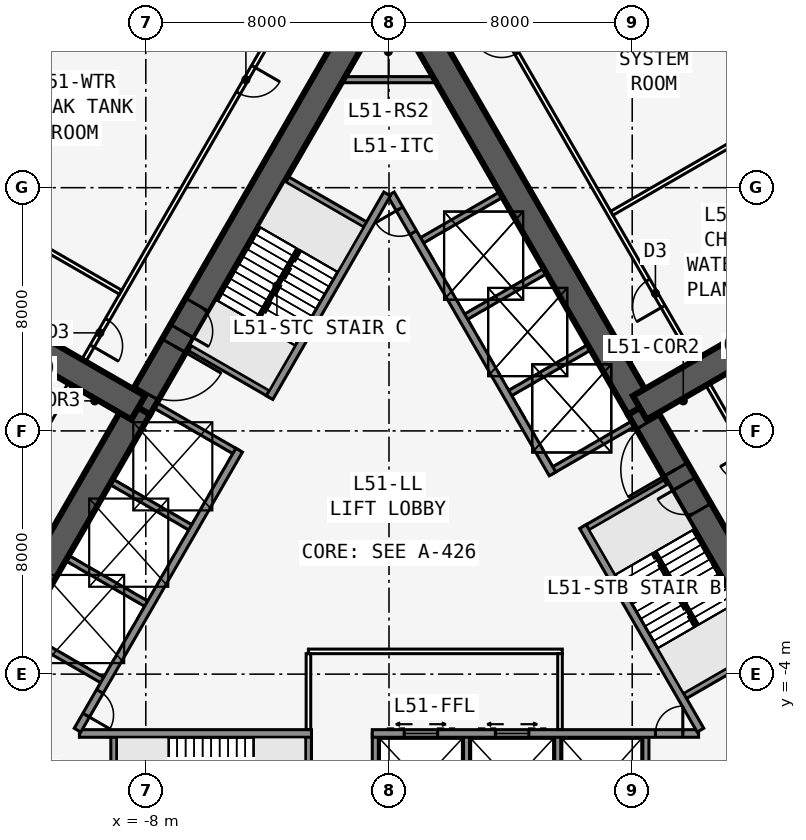
"""IFC4 building model, lengths in metres.
Left out: names, types, materials, properties, quantities, classifications, styles, units other than length and angle.
Written with IfcOpenShell. Run it as: python <this file> out.ifc"""

import sys

from ifc_helpers import new_model, si_unit, direction, frame, frame_2d, origin, place, context, subcontext, project, spatial, rectangle, extrude, element, fill, save


model = new_model("IFC4")
c1 = context("Model", 3, precision=1e-05, world=origin(), true_north=direction((0.0, 1.0)))
c2 = subcontext(c1, "Body", "Model", "MODEL_VIEW")
j1 = project(units=[si_unit("LENGTHUNIT", "METRE"), si_unit("PLANEANGLEUNIT", "RADIAN")], contexts=[c1])
p1 = place(None, origin())
s1 = spatial("IfcSite", under=j1, at=p1, CompositionType="ELEMENT")
p2 = place(p1, origin())
s2 = spatial("IfcBuilding", under=s1, at=p2, CompositionType="ELEMENT")
p3 = place(p2, frame((0.0, 0.0, 189.5)))
s3 = spatial("IfcBuildingStorey", under=s2, at=p3, CompositionType="ELEMENT", Elevation=189.5)
p4 = place(p3, frame((-10.183, -5.951, 0.0), z_axis=(0.0, 0.0, 1.0), x_axis=(1.0, 0.0, 0.0)))
e1 = element("IfcWall", 1, at=p4, inside=s3, PredefinedType="SOLIDWALL", context=c2, shape_type="SweptSolid", body=[
    extrude(rectangle(XDim=7.633, YDim=0.25, at=frame_2d((3.816, 0.0))), origin(), (0.0, 0.0, 1.0), 6.15),
])
p5 = place(p3, frame((-0.55, -5.951, 0.0), z_axis=(0.0, 0.0, 1.0), x_axis=(1.0, 0.0, 0.0)))
e2 = element("IfcWall", 2, at=p5, inside=s3, PredefinedType="SOLIDWALL", context=c2, shape_type="SweptSolid", body=[
    extrude(rectangle(XDim=10.733, YDim=0.25, at=frame_2d((5.366, 0.0))), origin(), (0.0, 0.0, 1.0), 6.15),
])
p6 = place(p5, frame((9.314, 0.0, 0.0)))
e3 = element("IfcOpeningElement", 3, at=p6, cuts=e2, PredefinedType="OPENING", context=c2, shape_type="SweptSolid", body=[
    extrude(rectangle(XDim=0.9, YDim=2.13, at=frame_2d((0.45, 1.065))), frame((0.0, 0.135, 0.0), z_axis=(0.0, -1.0, 0.0), x_axis=(1.0, 0.0, 0.0)), (0.0, 0.0, 1.0), 0.27),
])
p7 = place(p5, frame((1.05, 0.0, 0.0)))
e4 = element("IfcOpeningElement", 4, at=p7, cuts=e2, PredefinedType="OPENING", context=c2, shape_type="SweptSolid", body=[
    extrude(rectangle(XDim=1.1, YDim=2.13, at=frame_2d((0.55, 1.065))), frame((0.0, 0.135, 0.0), z_axis=(0.0, -1.0, 0.0), x_axis=(1.0, 0.0, 0.0)), (0.0, 0.0, 1.0), 0.27),
])
p8 = place(p5, frame((4.05, 0.0, 0.0)))
e5 = element("IfcOpeningElement", 5, at=p8, cuts=e2, PredefinedType="OPENING", context=c2, shape_type="SweptSolid", body=[
    extrude(rectangle(XDim=1.1, YDim=2.13, at=frame_2d((0.55, 1.065))), frame((0.0, 0.135, 0.0), z_axis=(0.0, -1.0, 0.0), x_axis=(1.0, 0.0, 0.0)), (0.0, 0.0, 1.0), 0.27),
])
p9 = place(p3, frame((-9.05, -5.951, 0.0), z_axis=(0.0, 0.0, 1.0), x_axis=(0.0, -1.0, 0.0)))
e6 = element("IfcWall", 6, at=p9, inside=s3, PredefinedType="SOLIDWALL", context=c2, shape_type="SweptSolid", body=[
    extrude(rectangle(XDim=3.125, YDim=0.2, at=frame_2d((1.562, 0.0))), origin(), (0.0, 0.0, 1.0), 6.15),
])
p10 = place(p3, frame((-2.65, -5.951, 0.0), z_axis=(0.0, 0.0, 1.0), x_axis=(0.0, -1.0, 0.0)))
e7 = element("IfcWall", 7, at=p10, inside=s3, PredefinedType="SOLIDWALL", context=c2, shape_type="SweptSolid", body=[
    extrude(rectangle(XDim=3.125, YDim=0.2, at=frame_2d((1.562, 0.0))), origin(), (0.0, 0.0, 1.0), 6.15),
])
p11 = place(p10, frame((1.525, 0.0, 0.0)))
e8 = element("IfcOpeningElement", 8, at=p11, cuts=e7, PredefinedType="OPENING", context=c2, shape_type="SweptSolid", body=[
    extrude(rectangle(XDim=1.0, YDim=2.13, at=frame_2d((0.5, 1.065))), frame((0.0, 0.11, 0.0), z_axis=(0.0, -1.0, 0.0), x_axis=(1.0, 0.0, 0.0)), (0.0, 0.0, 1.0), 0.22),
])
for number, where, z_axis, x_axis in (
    (9, (-0.45, -5.951, 0.0), (0.0, 0.0, 1.0), (0.0, -1.0, 0.0)),
    (10, (2.55, -5.951, 0.0), (0.0, 0.0, 1.0), (0.0, -1.0, 0.0)),
    (11, (5.55, -5.951, 0.0), (0.0, 0.0, 1.0), (0.0, -1.0, 0.0)),
    (12, (8.45, -5.951, 0.0), (0.0, 0.0, 1.0), (0.0, -1.0, 0.0)),
):
    element("IfcWall", number, at=place(p3, frame(where, z_axis=z_axis, x_axis=x_axis)), inside=s3, PredefinedType="SOLIDWALL", context=c2, shape_type="SweptSolid", body=[
        extrude(rectangle(XDim=3.125, YDim=0.2, at=frame_2d((1.562, 0.0))), origin(), (0.0, 0.0, 1.0), 6.15),
    ])
p12 = place(p3, frame((16.5, -9.526, 0.0), z_axis=(0.0, 0.0, 1.0), x_axis=(-0.499996545922, 0.866027397988, 0.0)))
e13 = element("IfcWall", 13, at=p12, inside=s3, PredefinedType="SHEAR", context=c2, shape_type="SweptSolid", body=[
    extrude(rectangle(XDim=16.5, YDim=0.9, at=frame_2d((8.25, 0.0))), origin(), (0.0, 0.0, 1.0), 6.4),
])
p13 = place(p12, frame((14.15, 0.0, 0.0)))
e14 = element("IfcOpeningElement", 14, at=p13, cuts=e13, PredefinedType="OPENING", context=c2, shape_type="SweptSolid", body=[
    extrude(rectangle(XDim=1.8, YDim=2.13, at=frame_2d((0.9, 1.065))), frame((0.0, 0.46, 0.0), z_axis=(0.0, -1.0, 0.0), x_axis=(1.0, 0.0, 0.0)), (0.0, 0.0, 1.0), 0.92),
])
p14 = place(p12, frame((12.6, 0.0, 0.0)))
e15 = element("IfcOpeningElement", 15, at=p14, cuts=e13, PredefinedType="OPENING", context=c2, shape_type="SweptSolid", body=[
    extrude(rectangle(XDim=1.0, YDim=2.13, at=frame_2d((0.5, 1.065))), frame((0.0, 0.46, 0.0), z_axis=(0.0, -1.0, 0.0), x_axis=(1.0, 0.0, 0.0)), (0.0, 0.0, 1.0), 0.92),
])
p15 = place(p3, frame((8.25, 4.763, 0.0), z_axis=(0.0, 0.0, 1.0), x_axis=(-0.500002952946, 0.866023698893, 0.0)))
e16 = element("IfcWall", 16, at=p15, inside=s3, PredefinedType="SHEAR", context=c2, shape_type="SweptSolid", body=[
    extrude(rectangle(XDim=16.5, YDim=0.9, at=frame_2d((8.25, 0.0))), origin(), (0.0, 0.0, 1.0), 6.4),
])
p16 = place(p3, frame((10.245, -5.843, 0.0), z_axis=(0.0, 0.0, 1.0), x_axis=(-0.499993009313, 0.866029439822, 0.0)))
e17 = element("IfcWall", 17, at=p16, inside=s3, PredefinedType="SOLIDWALL", context=c2, shape_type="SweptSolid", body=[
    extrude(rectangle(XDim=7.733, YDim=0.25, at=frame_2d((3.866, 0.0))), origin(), (0.0, 0.0, 1.0), 6.15),
])
p17 = place(p3, frame((5.379, 2.586, 0.0), z_axis=(0.0, 0.0, 1.0), x_axis=(-0.500001375892, 0.866024609411, 0.0)))
e18 = element("IfcWall", 18, at=p17, inside=s3, PredefinedType="SOLIDWALL", context=c2, shape_type="SweptSolid", body=[
    extrude(rectangle(XDim=10.633, YDim=0.25, at=frame_2d((5.316, 0.0))), origin(), (0.0, 0.0, 1.0), 6.15),
])
p18 = place(p17, frame((9.164, 0.0, 0.0)))
e19 = element("IfcOpeningElement", 19, at=p18, cuts=e18, PredefinedType="OPENING", context=c2, shape_type="SweptSolid", body=[
    extrude(rectangle(XDim=0.9, YDim=2.13, at=frame_2d((0.45, 1.065))), frame((0.0, 0.135, 0.0), z_axis=(0.0, -1.0, 0.0), x_axis=(1.0, 0.0, 0.0)), (0.0, 0.0, 1.0), 0.27),
])
for number, where, z_axis, x_axis in (
    (20, (9.629, -4.775, 0.0), (0.0, 0.0, 1.0), (0.866, 0.5, 0.0)),
    (21, (6.429, 0.767, 0.0), (0.0, 0.0, 1.0), (0.866, 0.5, 0.0)),
    (22, (5.329, 2.673, 0.0), (0.0, 0.0, 1.0), (0.866, 0.5, 0.0)),
    (23, (3.879, 5.184, 0.0), (0.0, 0.0, 1.0), (0.866, 0.5, 0.0)),
    (24, (2.429, 7.696, 0.0), (0.0, 0.0, 1.0), (0.866, 0.5, 0.0)),
    (25, (0.979, 10.207, 0.0), (0.0, 0.0, 1.0), (0.866, 0.5, 0.0)),
):
    element("IfcWall", number, at=place(p3, frame(where, z_axis=z_axis, x_axis=x_axis)), inside=s3, PredefinedType="SOLIDWALL", context=c2, shape_type="SweptSolid", body=[
        extrude(rectangle(XDim=3.125, YDim=0.2, at=frame_2d((1.562, 0.0))), origin(), (0.0, 0.0, 1.0), 6.15),
    ])
p19 = place(p3, frame((0.0, 19.052, 0.0), z_axis=(0.0, 0.0, 1.0), x_axis=(-0.500002952946, -0.866023698893, 0.0)))
e26 = element("IfcWall", 26, at=p19, inside=s3, PredefinedType="SHEAR", context=c2, shape_type="SweptSolid", body=[
    extrude(rectangle(XDim=16.5, YDim=0.9, at=frame_2d((8.25, 0.0))), origin(), (0.0, 0.0, 1.0), 6.4),
])
p20 = place(p19, frame((14.15, 0.0, 0.0)))
e27 = element("IfcOpeningElement", 27, at=p20, cuts=e26, PredefinedType="OPENING", context=c2, shape_type="SweptSolid", body=[
    extrude(rectangle(XDim=1.8, YDim=2.13, at=frame_2d((0.9, 1.065))), frame((0.0, 0.46, 0.0), z_axis=(0.0, -1.0, 0.0), x_axis=(1.0, 0.0, 0.0)), (0.0, 0.0, 1.0), 0.92),
])
p21 = place(p19, frame((12.6, 0.0, 0.0)))
e28 = element("IfcOpeningElement", 28, at=p21, cuts=e26, PredefinedType="OPENING", context=c2, shape_type="SweptSolid", body=[
    extrude(rectangle(XDim=1.0, YDim=2.13, at=frame_2d((0.5, 1.065))), frame((0.0, 0.46, 0.0), z_axis=(0.0, -1.0, 0.0), x_axis=(1.0, 0.0, 0.0)), (0.0, 0.0, 1.0), 0.92),
])
p22 = place(p3, frame((-8.25, 4.763, 0.0), z_axis=(0.0, 0.0, 1.0), x_axis=(-0.499996545922, -0.866027397988, 0.0)))
e29 = element("IfcWall", 29, at=p22, inside=s3, PredefinedType="SHEAR", context=c2, shape_type="SweptSolid", body=[
    extrude(rectangle(XDim=16.5, YDim=0.9, at=frame_2d((8.25, 0.0))), origin(), (0.0, 0.0, 1.0), 6.4),
])
p23 = place(p3, frame((-0.062, 11.794, 0.0), z_axis=(0.0, 0.0, 1.0), x_axis=(-0.500006680225, -0.86602154692, 0.0)))
e30 = element("IfcWall", 30, at=p23, inside=s3, PredefinedType="SOLIDWALL", context=c2, shape_type="SweptSolid", body=[
    extrude(rectangle(XDim=7.733, YDim=0.25, at=frame_2d((3.866, 0.0))), origin(), (0.0, 0.0, 1.0), 6.15),
])
p24 = place(p3, frame((-4.929, 3.365, 0.0), z_axis=(0.0, 0.0, 1.0), x_axis=(-0.499991433582, -0.866030349552, 0.0)))
e31 = element("IfcWall", 31, at=p24, inside=s3, PredefinedType="SOLIDWALL", context=c2, shape_type="SweptSolid", body=[
    extrude(rectangle(XDim=10.633, YDim=0.25, at=frame_2d((5.316, 0.0))), origin(), (0.0, 0.0, 1.0), 6.15),
])
p25 = place(p24, frame((9.164, 0.0, 0.0)))
e32 = element("IfcOpeningElement", 32, at=p25, cuts=e31, PredefinedType="OPENING", context=c2, shape_type="SweptSolid", body=[
    extrude(rectangle(XDim=0.9, YDim=2.13, at=frame_2d((0.45, 1.065))), frame((0.0, 0.135, 0.0), z_axis=(0.0, -1.0, 0.0), x_axis=(1.0, 0.0, 0.0)), (0.0, 0.0, 1.0), 0.27),
])
for number, where, z_axis, x_axis in (
    (33, (-0.679, 10.727, 0.0), (0.0, 0.0, 1.0), (-0.866, 0.5, 0.0)),
    (34, (-3.879, 5.184, 0.0), (0.0, 0.0, 1.0), (-0.866, 0.5, 0.0)),
    (35, (-4.979, 3.279, 0.0), (0.0, 0.0, 1.0), (-0.866, 0.5, 0.0)),
    (36, (-6.429, 0.767, 0.0), (0.0, 0.0, 1.0), (-0.866, 0.5, 0.0)),
    (37, (-7.879, -1.744, 0.0), (0.0, 0.0, 1.0), (-0.866, 0.5, 0.0)),
    (38, (-9.329, -4.256, 0.0), (0.0, 0.0, 1.0), (-0.866, 0.5, 0.0)),
):
    element("IfcWall", number, at=place(p3, frame(where, z_axis=z_axis, x_axis=x_axis)), inside=s3, PredefinedType="SOLIDWALL", context=c2, shape_type="SweptSolid", body=[
        extrude(rectangle(XDim=3.125, YDim=0.2, at=frame_2d((1.562, 0.0))), origin(), (0.0, 0.0, 1.0), 6.15),
    ])
for number, where, z_axis, x_axis in (
    (39, (8.25, 4.763, 0.0), (0.0, 0.0, 1.0), (0.866, 0.5, 0.0)),
    (40, (-8.25, 4.763, 0.0), (0.0, 0.0, 1.0), (-0.866, 0.5, 0.0)),
):
    element("IfcWall", number, at=place(p3, frame(where, z_axis=z_axis, x_axis=x_axis)), inside=s3, PredefinedType="SHEAR", context=c2, shape_type="SweptSolid", body=[
        extrude(rectangle(XDim=8.154, YDim=0.9, at=frame_2d((4.077, 0.0))), origin(), (0.0, 0.0, 1.0), 6.4),
    ])
p26 = place(p3, frame((20.027, -10.985, 0.0), z_axis=(0.0, 0.0, 1.0), x_axis=(-0.500001677587, 0.866024435227, 0.0)))
e41 = element("IfcWall", 41, at=p26, inside=s3, PredefinedType="PARTITIONING", context=c2, shape_type="SweptSolid", body=[
    extrude(rectangle(XDim=39.054, YDim=0.15, at=frame_2d((19.527, 0.0))), origin(), (0.0, 0.0, 1.0), 6.15),
])
p27 = place(p26, frame((5.914, 0.0, 0.0)))
e42 = element("IfcOpeningElement", 42, at=p27, cuts=e41, PredefinedType="OPENING", context=c2, shape_type="SweptSolid", body=[
    extrude(rectangle(XDim=1.0, YDim=2.13, at=frame_2d((0.5, 1.065))), frame((0.0, 0.085, 0.0), z_axis=(0.0, -1.0, 0.0), x_axis=(1.0, 0.0, 0.0)), (0.0, 0.0, 1.0), 0.17),
])
p28 = place(p26, frame((15.527, 0.0, 0.0)))
e43 = element("IfcOpeningElement", 43, at=p28, cuts=e41, PredefinedType="OPENING", context=c2, shape_type="SweptSolid", body=[
    extrude(rectangle(XDim=1.0, YDim=2.13, at=frame_2d((0.5, 1.065))), frame((0.0, 0.085, 0.0), z_axis=(0.0, -1.0, 0.0), x_axis=(1.0, 0.0, 0.0)), (0.0, 0.0, 1.0), 0.17),
])
p29 = place(p26, frame((22.027, 0.0, 0.0)))
e44 = element("IfcOpeningElement", 44, at=p29, cuts=e41, PredefinedType="OPENING", context=c2, shape_type="SweptSolid", body=[
    extrude(rectangle(XDim=1.0, YDim=2.13, at=frame_2d((0.5, 1.065))), frame((0.0, 0.085, 0.0), z_axis=(0.0, -1.0, 0.0), x_axis=(1.0, 0.0, 0.0)), (0.0, 0.0, 1.0), 0.17),
])
p30 = place(p26, frame((31.64, 0.0, 0.0)))
e45 = element("IfcOpeningElement", 45, at=p30, cuts=e41, PredefinedType="OPENING", context=c2, shape_type="SweptSolid", body=[
    extrude(rectangle(XDim=1.0, YDim=2.13, at=frame_2d((0.5, 1.065))), frame((0.0, 0.085, 0.0), z_axis=(0.0, -1.0, 0.0), x_axis=(1.0, 0.0, 0.0)), (0.0, 0.0, 1.0), 0.17),
])
p31 = place(p3, frame((7.329, 11.159, 0.0), z_axis=(0.0, 0.0, 1.0), x_axis=(0.866010828688, 0.500025243958, 0.0)))
e46 = element("IfcWall", 46, at=p31, inside=s3, PredefinedType="PARTITIONING", context=c2, shape_type="SweptSolid", body=[
    extrude(rectangle(XDim=8.817, YDim=0.15, at=frame_2d((4.409, 0.0))), origin(), (0.0, 0.0, 1.0), 6.15),
])
p32 = place(p3, frame((-0.5, 22.836, 0.0), z_axis=(0.0, 0.0, 1.0), x_axis=(-0.500001677587, -0.866024435227, 0.0)))
e47 = element("IfcWall", 47, at=p32, inside=s3, PredefinedType="PARTITIONING", context=c2, shape_type="SweptSolid", body=[
    extrude(rectangle(XDim=39.054, YDim=0.15, at=frame_2d((19.527, 0.0))), origin(), (0.0, 0.0, 1.0), 6.15),
])
p33 = place(p32, frame((7.914, 0.0, 0.0)))
e48 = element("IfcOpeningElement", 48, at=p33, cuts=e47, PredefinedType="OPENING", context=c2, shape_type="SweptSolid", body=[
    extrude(rectangle(XDim=1.0, YDim=2.13, at=frame_2d((0.5, 1.065))), frame((0.0, 0.085, 0.0), z_axis=(0.0, -1.0, 0.0), x_axis=(1.0, 0.0, 0.0)), (0.0, 0.0, 1.0), 0.17),
])
p34 = place(p32, frame((17.527, 0.0, 0.0)))
e49 = element("IfcOpeningElement", 49, at=p34, cuts=e47, PredefinedType="OPENING", context=c2, shape_type="SweptSolid", body=[
    extrude(rectangle(XDim=1.0, YDim=2.13, at=frame_2d((0.5, 1.065))), frame((0.0, 0.085, 0.0), z_axis=(0.0, -1.0, 0.0), x_axis=(1.0, 0.0, 0.0)), (0.0, 0.0, 1.0), 0.17),
])
p35 = place(p32, frame((28.64, 0.0, 0.0)))
e50 = element("IfcOpeningElement", 50, at=p35, cuts=e47, PredefinedType="OPENING", context=c2, shape_type="SweptSolid", body=[
    extrude(rectangle(XDim=1.0, YDim=2.13, at=frame_2d((0.5, 1.065))), frame((0.0, 0.085, 0.0), z_axis=(0.0, -1.0, 0.0), x_axis=(1.0, 0.0, 0.0)), (0.0, 0.0, 1.0), 0.17),
])
p36 = place(p3, frame((-8.829, 8.561, 0.0), z_axis=(0.0, 0.0, 1.0), x_axis=(-0.866021034389, 0.500007567939, 0.0)))
e51 = element("IfcWall", 51, at=p36, inside=s3, PredefinedType="PARTITIONING", context=c2, shape_type="SweptSolid", body=[
    extrude(rectangle(XDim=8.993, YDim=0.15, at=frame_2d((4.497, 0.0))), origin(), (0.0, 0.0, 1.0), 6.15),
])
p37 = place(p3, frame((-2.65, -3.251, 0.0), z_axis=(0.0, 0.0, 1.0), x_axis=(1.0, 0.0, 0.0)))
e52 = element("IfcWall", 52, at=p37, inside=s3, PredefinedType="PARTITIONING", context=c2, shape_type="SweptSolid", body=[
    extrude(rectangle(XDim=8.35, YDim=0.15, at=frame_2d((4.175, 0.0))), origin(), (0.0, 0.0, 1.0), 6.15),
])
for number, where, z_axis, x_axis in (
    (53, (-2.65, -5.826, 0.0), (0.0, 0.0, 1.0), (0.0, 1.0, 0.0)),
    (54, (5.625, -5.826, 0.0), (0.0, 0.0, 1.0), (0.0, 1.0, 0.0)),
):
    element("IfcWall", number, at=place(p3, frame(where, z_axis=z_axis, x_axis=x_axis)), inside=s3, PredefinedType="PARTITIONING", context=c2, shape_type="SweptSolid", body=[
        extrude(rectangle(XDim=2.5, YDim=0.15, at=frame_2d((1.25, 0.0))), origin(), (0.0, 0.0, 1.0), 6.15),
    ])
p38 = place(p3, frame((-1.501, 15.552, 0.0), z_axis=(0.0, 0.0, 1.0), x_axis=(1.0, 0.0, 0.0)))
e55 = element("IfcWall", 55, at=p38, inside=s3, PredefinedType="SOLIDWALL", context=c2, shape_type="SweptSolid", body=[
    extrude(rectangle(XDim=3.002, YDim=0.2, at=frame_2d((1.501, 0.0))), origin(), (0.0, 0.0, 1.0), 6.15),
])
for number, where, z_axis, x_axis in (
    (56, (10.135, -2.401, 0.0), (0.0, 0.0, 1.0), (-0.5, 0.866, 0.0)),
    (57, (-2.988, 9.978, 0.0), (0.0, 0.0, 1.0), (-0.5, -0.866, 0.0)),
):
    element("IfcWall", number, at=place(p3, frame(where, z_axis=z_axis, x_axis=x_axis)), inside=s3, PredefinedType="SOLIDWALL", context=c2, shape_type="SweptSolid", body=[
        extrude(rectangle(XDim=2.794, YDim=0.1, at=frame_2d((1.397, 0.0))), origin(), (0.0, 0.0, 1.0), 6.4),
    ])
p39 = place(p29, origin())
e58 = element("IfcDoor", 58, at=p39, inside=s3, OperationType="SINGLE_SWING_LEFT", PredefinedType="DOOR", context=c2, shape_type="SweptSolid", body=[
    extrude(rectangle(XDim=1.0, YDim=2.13, at=frame_2d((0.5, 1.065))), frame((0.0, 0.025, 0.0), z_axis=(0.0, -1.0, 0.0), x_axis=(1.0, 0.0, 0.0)), (0.0, 0.0, 1.0), 0.05),
])
fill(e44, e58)
p40 = place(p30, origin())
e59 = element("IfcDoor", 59, at=p40, inside=s3, OperationType="SINGLE_SWING_RIGHT", PredefinedType="DOOR", context=c2, shape_type="SweptSolid", body=[
    extrude(rectangle(XDim=1.0, YDim=2.13, at=frame_2d((0.5, 1.065))), frame((0.0, 0.025, 0.0), z_axis=(0.0, -1.0, 0.0), x_axis=(1.0, 0.0, 0.0)), (0.0, 0.0, 1.0), 0.05),
])
fill(e45, e59)
p41 = place(p33, origin())
e60 = element("IfcDoor", 60, at=p41, inside=s3, OperationType="SINGLE_SWING_LEFT", PredefinedType="DOOR", context=c2, shape_type="SweptSolid", body=[
    extrude(rectangle(XDim=1.0, YDim=2.13, at=frame_2d((0.5, 1.065))), frame((0.0, 0.025, 0.0), z_axis=(0.0, -1.0, 0.0), x_axis=(1.0, 0.0, 0.0)), (0.0, 0.0, 1.0), 0.05),
])
fill(e48, e60)
p42 = place(p34, origin())
e61 = element("IfcDoor", 61, at=p42, inside=s3, OperationType="SINGLE_SWING_RIGHT", PredefinedType="DOOR", context=c2, shape_type="SweptSolid", body=[
    extrude(rectangle(XDim=1.0, YDim=2.13, at=frame_2d((0.5, 1.065))), frame((0.0, 0.025, 0.0), z_axis=(0.0, -1.0, 0.0), x_axis=(1.0, 0.0, 0.0)), (0.0, 0.0, 1.0), 0.05),
])
fill(e49, e61)
p43 = place(p13, origin())
e62 = element("IfcDoor", 62, at=p43, inside=s3, OperationType="DOUBLE_DOOR_SINGLE_SWING", PredefinedType="DOOR", context=c2, shape_type="SweptSolid", body=[
    extrude(rectangle(XDim=1.8, YDim=2.13, at=frame_2d((0.9, 1.065))), frame((0.0, 0.025, 0.0), z_axis=(0.0, -1.0, 0.0), x_axis=(1.0, 0.0, 0.0)), (0.0, 0.0, 1.0), 0.05),
])
fill(e14, e62)
p44 = place(p14, origin())
e63 = element("IfcDoor", 63, at=p44, inside=s3, OperationType="SINGLE_SWING_RIGHT", PredefinedType="DOOR", context=c2, shape_type="SweptSolid", body=[
    extrude(rectangle(XDim=1.0, YDim=2.13, at=frame_2d((0.5, 1.065))), frame((0.0, 0.025, 0.0), z_axis=(0.0, -1.0, 0.0), x_axis=(1.0, 0.0, 0.0)), (0.0, 0.0, 1.0), 0.05),
])
fill(e15, e63)
p45 = place(p20, origin())
e64 = element("IfcDoor", 64, at=p45, inside=s3, OperationType="DOUBLE_DOOR_SINGLE_SWING", PredefinedType="DOOR", context=c2, shape_type="SweptSolid", body=[
    extrude(rectangle(XDim=1.8, YDim=2.13, at=frame_2d((0.9, 1.065))), frame((0.0, 0.025, 0.0), z_axis=(0.0, -1.0, 0.0), x_axis=(1.0, 0.0, 0.0)), (0.0, 0.0, 1.0), 0.05),
])
fill(e27, e64)
p46 = place(p21, origin())
e65 = element("IfcDoor", 65, at=p46, inside=s3, OperationType="SINGLE_SWING_RIGHT", PredefinedType="DOOR", context=c2, shape_type="SweptSolid", body=[
    extrude(rectangle(XDim=1.0, YDim=2.13, at=frame_2d((0.5, 1.065))), frame((0.0, 0.025, 0.0), z_axis=(0.0, -1.0, 0.0), x_axis=(1.0, 0.0, 0.0)), (0.0, 0.0, 1.0), 0.05),
])
fill(e28, e65)
p47 = place(p6, origin())
e66 = element("IfcDoor", 66, at=p47, inside=s3, OperationType="SINGLE_SWING_RIGHT", PredefinedType="DOOR", context=c2, shape_type="SweptSolid", body=[
    extrude(rectangle(XDim=0.9, YDim=2.13, at=frame_2d((0.45, 1.065))), frame((0.0, 0.025, 0.0), z_axis=(0.0, -1.0, 0.0), x_axis=(1.0, 0.0, 0.0)), (0.0, 0.0, 1.0), 0.05),
])
fill(e3, e66)
p48 = place(p18, origin())
e67 = element("IfcDoor", 67, at=p48, inside=s3, OperationType="SINGLE_SWING_RIGHT", PredefinedType="DOOR", context=c2, shape_type="SweptSolid", body=[
    extrude(rectangle(XDim=0.9, YDim=2.13, at=frame_2d((0.45, 1.065))), frame((0.0, 0.025, 0.0), z_axis=(0.0, -1.0, 0.0), x_axis=(1.0, 0.0, 0.0)), (0.0, 0.0, 1.0), 0.05),
])
fill(e19, e67)
p49 = place(p25, origin())
e68 = element("IfcDoor", 68, at=p49, inside=s3, OperationType="SINGLE_SWING_RIGHT", PredefinedType="DOOR", context=c2, shape_type="SweptSolid", body=[
    extrude(rectangle(XDim=0.9, YDim=2.13, at=frame_2d((0.45, 1.065))), frame((0.0, 0.025, 0.0), z_axis=(0.0, -1.0, 0.0), x_axis=(1.0, 0.0, 0.0)), (0.0, 0.0, 1.0), 0.05),
])
fill(e32, e68)
p50 = place(p7, origin())
e69 = element("IfcDoor", 69, at=p50, inside=s3, OperationType="DOUBLE_DOOR_SLIDING", PredefinedType="USERDEFINED", context=c2, shape_type="SweptSolid", body=[
    extrude(rectangle(XDim=1.1, YDim=2.13, at=frame_2d((0.55, 1.065))), frame((0.0, 0.025, 0.0), z_axis=(0.0, -1.0, 0.0), x_axis=(1.0, 0.0, 0.0)), (0.0, 0.0, 1.0), 0.05),
])
fill(e4, e69)
p51 = place(p8, origin())
e70 = element("IfcDoor", 70, at=p51, inside=s3, OperationType="DOUBLE_DOOR_SLIDING", PredefinedType="USERDEFINED", context=c2, shape_type="SweptSolid", body=[
    extrude(rectangle(XDim=1.1, YDim=2.13, at=frame_2d((0.55, 1.065))), frame((0.0, 0.025, 0.0), z_axis=(0.0, -1.0, 0.0), x_axis=(1.0, 0.0, 0.0)), (0.0, 0.0, 1.0), 0.05),
])
fill(e5, e70)
save(model, sys.argv[1])
